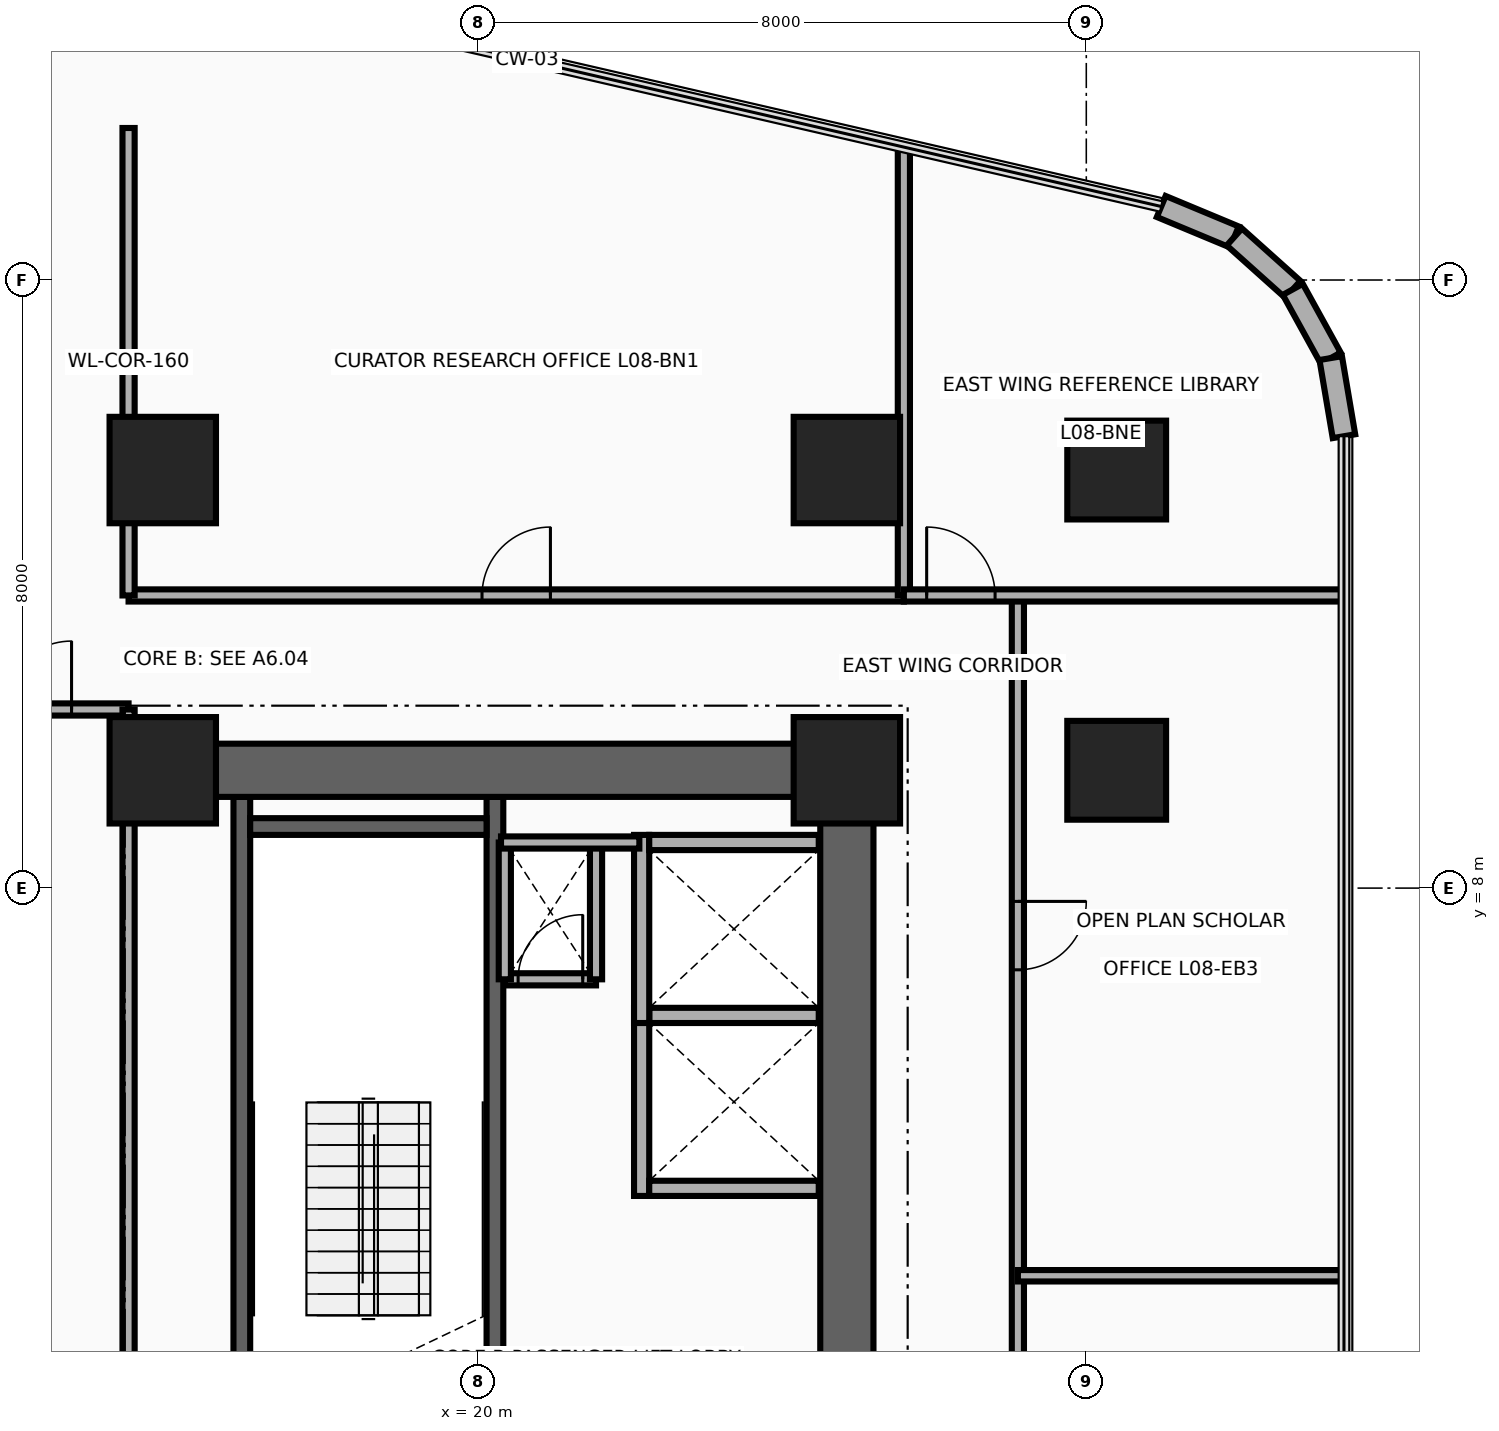
"""IFC4 building model, lengths in metres.
Left out: names, types, materials, properties, quantities, classifications, styles, units other than length and angle.
Written with IfcOpenShell. Run it as: python <this file> out.ifc"""

import sys

from ifc_helpers import new_model, si_unit, direction, frame, frame_2d, origin, origin_2d, place, context, subcontext, project, spatial, rectangle, circle, extrude, source, transform, mapped, element, fill, save


model = new_model("IFC4")
c1 = context("Model", 3, precision=1e-05, world=origin(), true_north=direction((0.0, 1.0)))
c2 = subcontext(c1, "Body", "Model", "MODEL_VIEW")
j1 = project(units=[si_unit("LENGTHUNIT", "METRE"), si_unit("PLANEANGLEUNIT", "RADIAN")], contexts=[c1])
p1 = place(None, origin())
s1 = spatial("IfcSite", under=j1, at=p1, CompositionType="ELEMENT")
p2 = place(p1, origin())
s2 = spatial("IfcBuilding", under=s1, at=p2, CompositionType="ELEMENT")
p3 = place(p2, frame((0.0, 0.0, 37.1)))
s3 = spatial("IfcBuildingStorey", under=s2, at=p3, CompositionType="ELEMENT", Elevation=37.1)
for number, where, z_axis, x_axis in (
    (1, (16.89, 0.68, 0.0), (0.0, 0.0, 1.0), (0.0, 1.0, 0.0)),
    (2, (20.22, 0.68, 0.0), (0.0, 0.0, 1.0), (0.0, 1.0, 0.0)),
):
    element("IfcWall", number, at=place(p3, frame(where, z_axis=z_axis, x_axis=x_axis)), inside=s3, PredefinedType="SHEAR", context=c2, shape_type="SweptSolid", body=[
        extrude(rectangle(XDim=8.52, YDim=0.22, at=frame_2d((4.26, 0.0))), origin(), (0.0, 0.0, 1.0), 3.46),
    ])
p4 = place(p3, frame((17.0, 8.81, 0.0), z_axis=(0.0, 0.0, 1.0), x_axis=(1.0, 0.0, 0.0)))
e3 = element("IfcWall", 3, at=p4, inside=s3, PredefinedType="SHEAR", context=c2, shape_type="SweptSolid", body=[
    extrude(rectangle(XDim=3.11, YDim=0.22, at=frame_2d((1.555, 0.0))), origin(), (0.0, 0.0, 1.0), 3.46),
])
p5 = place(p3, frame((24.85, 0.95, 0.0), z_axis=(0.0, 0.0, 1.0), x_axis=(0.0, 1.0, 0.0)))
e4 = element("IfcWall", 4, at=p5, inside=s3, PredefinedType="SHEAR", context=c2, shape_type="SweptSolid", body=[
    extrude(rectangle(XDim=8.95, YDim=0.7, at=frame_2d((4.475, 0.0))), origin(), (0.0, 0.0, 1.0), 3.46),
])
p6 = place(p3, frame((15.85, 9.55, 0.0), z_axis=(0.0, 0.0, 1.0), x_axis=(1.0, 0.0, 0.0)))
e5 = element("IfcWall", 5, at=p6, inside=s3, PredefinedType="SHEAR", context=c2, shape_type="SweptSolid", body=[
    extrude(rectangle(XDim=9.0, YDim=0.7, at=frame_2d((4.5, 0.0))), origin(), (0.0, 0.0, 1.0), 3.46),
])
m1 = source(origin(), c2, "Body", "SweptSolid", [
    extrude(rectangle(XDim=1.4, YDim=1.4, at=origin_2d()), origin(), (0.0, 0.0, 1.0), 3.7),
])
for number, where, z_axis, x_axis in (
    (6, (15.85, 9.55, 0.0), (0.0, 0.0, 1.0), (1.0, 0.0, 0.0)),
    (7, (24.85, 9.55, 0.0), (0.0, 0.0, 1.0), (1.0, 0.0, 0.0)),
):
    element("IfcColumn", number, at=place(p3, frame(where, z_axis=z_axis, x_axis=x_axis)), inside=s3, PredefinedType="COLUMN", context=c2, shape_type="MappedRepresentation", body=[
        mapped(m1, transform((0.0, 0.0, 0.0), x_axis=(1.0, 0.0, 0.0), y_axis=(0.0, 1.0, 0.0), z_axis=(0.0, 0.0, 1.0), scale=1.0)),
    ])
m2 = source(origin(), c2, "Body", "SweptSolid", [
    extrude(circle(Radius=0.65, at=origin_2d()), origin(), (0.0, 0.0, 1.0), 3.7),
])
p7 = place(p3, frame((28.4, 9.55, 0.0), z_axis=(0.0, 0.0, 1.0), x_axis=(1.0, 0.0, 0.0)))
e8 = element("IfcColumn", 8, at=p7, inside=s3, PredefinedType="COLUMN", context=c2, shape_type="MappedRepresentation", body=[
    mapped(m2, transform((0.0, 0.0, 0.0), x_axis=(1.0, 0.0, 0.0), y_axis=(0.0, 1.0, 0.0), z_axis=(0.0, 0.0, 1.0), scale=1.0)),
])
for number, where, z_axis, x_axis in (
    (9, (15.85, 13.5, 0.0), (0.0, 0.0, 1.0), (1.0, 0.0, 0.0)),
    (10, (24.85, 13.5, 0.0), (0.0, 0.0, 1.0), (1.0, 0.0, 0.0)),
):
    element("IfcColumn", number, at=place(p3, frame(where, z_axis=z_axis, x_axis=x_axis)), inside=s3, PredefinedType="COLUMN", context=c2, shape_type="MappedRepresentation", body=[
        mapped(m1, transform((0.0, 0.0, 0.0), x_axis=(1.0, 0.0, 0.0), y_axis=(0.0, 1.0, 0.0), z_axis=(0.0, 0.0, 1.0), scale=1.0)),
    ])
p8 = place(p3, frame((28.4, 13.5, 0.0), z_axis=(0.0, 0.0, 1.0), x_axis=(1.0, 0.0, 0.0)))
e11 = element("IfcColumn", 11, at=p8, inside=s3, PredefinedType="COLUMN", context=c2, shape_type="MappedRepresentation", body=[
    mapped(m2, transform((0.0, 0.0, 0.0), x_axis=(1.0, 0.0, 0.0), y_axis=(0.0, 1.0, 0.0), z_axis=(0.0, 0.0, 1.0), scale=1.0)),
])
p9 = place(p3, frame((28.986, 16.967, 0.0), z_axis=(0.0, 0.0, 1.0), x_axis=(0.923083852684, -0.384598753136, 0.0)))
e12 = element("IfcWall", 12, at=p9, inside=s3, PredefinedType="SOLIDWALL", context=c2, shape_type="SweptSolid", body=[
    extrude(rectangle(XDim=1.042, YDim=0.3, at=frame_2d((0.521, 0.0))), origin(), (0.0, 0.0, 1.0), 3.46),
])
p10 = place(p3, frame((29.948, 16.566, 0.0), z_axis=(0.0, 0.0, 1.0), x_axis=(0.744585645533, -0.66752694063, 0.0)))
e13 = element("IfcWall", 13, at=p10, inside=s3, PredefinedType="SOLIDWALL", context=c2, shape_type="SweptSolid", body=[
    extrude(rectangle(XDim=1.033, YDim=0.3, at=frame_2d((0.517, 0.0))), origin(), (0.0, 0.0, 1.0), 3.46),
])
p11 = place(p3, frame((30.717, 15.877, 0.0), z_axis=(0.0, 0.0, 1.0), x_axis=(0.482971098131, -0.875636293429, 0.0)))
e14 = element("IfcWall", 14, at=p11, inside=s3, PredefinedType="SOLIDWALL", context=c2, shape_type="SweptSolid", body=[
    extrude(rectangle(XDim=1.033, YDim=0.3, at=frame_2d((0.516, 0.0))), origin(), (0.0, 0.0, 1.0), 3.46),
])
p12 = place(p3, frame((31.216, 14.973, 0.0), z_axis=(0.0, 0.0, 1.0), x_axis=(0.167019462117, -0.985953598946, 0.0)))
e15 = element("IfcWall", 15, at=p12, inside=s3, PredefinedType="SOLIDWALL", context=c2, shape_type="SweptSolid", body=[
    extrude(rectangle(XDim=1.042, YDim=0.3, at=frame_2d((0.521, 0.0))), origin(), (0.0, 0.0, 1.0), 3.46),
])
p13 = place(p3, frame((22.15, 3.95, 0.0), z_axis=(0.0, 0.0, 1.0), x_axis=(0.0, 1.0, 0.0)))
e16 = element("IfcWall", 16, at=p13, inside=s3, PredefinedType="MOVABLE", context=c2, shape_type="SweptSolid", body=[
    extrude(rectangle(XDim=2.475, YDim=0.2, at=frame_2d((1.238, 0.0))), origin(), (0.0, 0.0, 1.0), 3.46),
])
for number, where, z_axis, x_axis in (
    (17, (22.25, 4.05, 0.0), (0.0, 0.0, 1.0), (1.0, 0.0, 0.0)),
    (18, (22.25, 6.325, 0.0), (0.0, 0.0, 1.0), (1.0, 0.0, 0.0)),
):
    element("IfcWall", number, at=place(p3, frame(where, z_axis=z_axis, x_axis=x_axis)), inside=s3, PredefinedType="MOVABLE", context=c2, shape_type="SweptSolid", body=[
        extrude(rectangle(XDim=2.23, YDim=0.2, at=frame_2d((1.115, 0.0))), origin(), (0.0, 0.0, 1.0), 2.245),
    ])
p14 = place(p3, frame((22.15, 6.225, 0.0), z_axis=(0.0, 0.0, 1.0), x_axis=(0.0, 1.0, 0.0)))
e19 = element("IfcWall", 19, at=p14, inside=s3, PredefinedType="MOVABLE", context=c2, shape_type="SweptSolid", body=[
    extrude(rectangle(XDim=2.475, YDim=0.2, at=frame_2d((1.237, 0.0))), origin(), (0.0, 0.0, 1.0), 3.46),
])
p15 = place(p3, frame((22.25, 8.6, 0.0), z_axis=(0.0, 0.0, 1.0), x_axis=(1.0, 0.0, 0.0)))
e20 = element("IfcWall", 20, at=p15, inside=s3, PredefinedType="MOVABLE", context=c2, shape_type="SweptSolid", body=[
    extrude(rectangle(XDim=2.23, YDim=0.2, at=frame_2d((1.115, 0.0))), origin(), (0.0, 0.0, 1.0), 2.245),
])
p16 = place(p3, frame((20.35, 6.8, 0.0), z_axis=(0.0, 0.0, 1.0), x_axis=(1.0, 0.0, 0.0)))
e21 = element("IfcWall", 21, at=p16, inside=s3, PredefinedType="PARTITIONING", context=c2, shape_type="SweptSolid", body=[
    extrude(rectangle(XDim=1.2, YDim=0.16, at=frame_2d((0.6, 0.0))), origin(), (0.0, 0.0, 1.0), 3.46),
])
p17 = place(p16, frame((0.175, 0.0, 0.0)))
e22 = element("IfcOpeningElement", 22, at=p17, cuts=e21, PredefinedType="OPENING", context=c2, shape_type="SweptSolid", body=[
    extrude(rectangle(XDim=0.85, YDim=2.05, at=frame_2d((0.425, 1.025))), frame((0.0, 0.095, 0.0), z_axis=(0.0, -1.0, 0.0), x_axis=(1.0, 0.0, 0.0)), (0.0, 0.0, 1.0), 0.19),
])
for number, where, z_axis, x_axis in (
    (23, (21.55, 6.8, 0.0), (0.0, 0.0, 1.0), (0.0, 1.0, 0.0)),
    (24, (20.35, 6.8, 0.0), (0.0, 0.0, 1.0), (0.0, 1.0, 0.0)),
):
    element("IfcWall", number, at=place(p3, frame(where, z_axis=z_axis, x_axis=x_axis)), inside=s3, PredefinedType="PARTITIONING", context=c2, shape_type="SweptSolid", body=[
        extrude(rectangle(XDim=1.8, YDim=0.16, at=frame_2d((0.9, 0.0))), origin(), (0.0, 0.0, 1.0), 3.46),
    ])
p18 = place(p3, frame((20.3, 8.6, 0.0), z_axis=(0.0, 0.0, 1.0), x_axis=(1.0, 0.0, 0.0)))
e25 = element("IfcWall", 25, at=p18, inside=s3, PredefinedType="PARTITIONING", context=c2, shape_type="SweptSolid", body=[
    extrude(rectangle(XDim=1.82, YDim=0.16, at=frame_2d((0.91, 0.0))), origin(), (0.0, 0.0, 1.0), 3.46),
])
p19 = place(p3, frame((15.4, 11.85, 0.0), z_axis=(0.0, 0.0, 1.0), x_axis=(1.0, 0.0, 0.0)))
e26 = element("IfcWall", 26, at=p19, inside=s3, PredefinedType="PARTITIONING", context=c2, shape_type="SweptSolid", body=[
    extrude(rectangle(XDim=10.2, YDim=0.16, at=frame_2d((5.1, 0.0))), origin(), (0.0, 0.0, 1.0), 2.834),
])
p20 = place(p19, frame((4.65, 0.0, 0.0)))
e27 = element("IfcOpeningElement", 27, at=p20, cuts=e26, PredefinedType="OPENING", context=c2, shape_type="SweptSolid", body=[
    extrude(rectangle(XDim=0.9, YDim=2.1, at=frame_2d((0.45, 1.05))), frame((0.0, 0.095, 0.0), z_axis=(0.0, -1.0, 0.0), x_axis=(1.0, 0.0, 0.0)), (0.0, 0.0, 1.0), 0.19),
])
p21 = place(p3, frame((15.4, 11.85, 0.0), z_axis=(0.0, 0.0, 1.0), x_axis=(0.0, 1.0, 0.0)))
e28 = element("IfcWall", 28, at=p21, inside=s3, PredefinedType="PARTITIONING", context=c2, shape_type="SweptSolid", body=[
    extrude(rectangle(XDim=6.15, YDim=0.16, at=frame_2d((3.075, 0.0))), origin(), (0.0, 0.0, 1.0), 2.583),
])
p22 = place(p3, frame((25.6, 11.85, 0.0), z_axis=(0.0, 0.0, 1.0), x_axis=(0.0, 1.0, 0.0)))
e29 = element("IfcWall", 29, at=p22, inside=s3, PredefinedType="PARTITIONING", context=c2, shape_type="SweptSolid", body=[
    extrude(rectangle(XDim=5.898, YDim=0.16, at=frame_2d((2.949, 0.0))), origin(), (0.0, 0.0, 1.0), 2.583),
])
p23 = place(p3, frame((27.1, -13.89, 0.0), z_axis=(0.0, 0.0, 1.0), x_axis=(0.0, 1.0, 0.0)))
e30 = element("IfcWall", 30, at=p23, inside=s3, PredefinedType="PARTITIONING", context=c2, shape_type="SweptSolid", body=[
    extrude(rectangle(XDim=25.74, YDim=0.16, at=frame_2d((12.87, 0.0))), origin(), (0.0, 0.0, 1.0), 2.583),
])
p24 = place(p23, frame((2.56, 0.0, 0.0)))
e31 = element("IfcOpeningElement", 31, at=p24, cuts=e30, PredefinedType="OPENING", context=c2, shape_type="SweptSolid", body=[
    extrude(rectangle(XDim=0.9, YDim=2.1, at=frame_2d((0.45, 1.05))), frame((0.0, 0.095, 0.0), z_axis=(0.0, -1.0, 0.0), x_axis=(1.0, 0.0, 0.0)), (0.0, 0.0, 1.0), 0.19),
])
p25 = place(p23, frame((12.16, 0.0, 0.0)))
e32 = element("IfcOpeningElement", 32, at=p25, cuts=e30, PredefinedType="OPENING", context=c2, shape_type="SweptSolid", body=[
    extrude(rectangle(XDim=0.9, YDim=2.1, at=frame_2d((0.45, 1.05))), frame((0.0, 0.095, 0.0), z_axis=(0.0, -1.0, 0.0), x_axis=(1.0, 0.0, 0.0)), (0.0, 0.0, 1.0), 0.19),
])
p26 = place(p23, frame((20.815, 0.0, 0.0)))
e33 = element("IfcOpeningElement", 33, at=p26, cuts=e30, PredefinedType="OPENING", context=c2, shape_type="SweptSolid", body=[
    extrude(rectangle(XDim=0.9, YDim=2.1, at=frame_2d((0.45, 1.05))), frame((0.0, 0.095, 0.0), z_axis=(0.0, -1.0, 0.0), x_axis=(1.0, 0.0, 0.0)), (0.0, 0.0, 1.0), 0.19),
])
p27 = place(p3, frame((25.6, 11.85, 0.0), z_axis=(0.0, 0.0, 1.0), x_axis=(1.0, 0.0, 0.0)))
e34 = element("IfcWall", 34, at=p27, inside=s3, PredefinedType="PARTITIONING", context=c2, shape_type="SweptSolid", body=[
    extrude(rectangle(XDim=5.79, YDim=0.16, at=frame_2d((2.895, 0.0))), origin(), (0.0, 0.0, 1.0), 2.896),
])
p28 = place(p27, frame((0.3, 0.0, 0.0)))
e35 = element("IfcOpeningElement", 35, at=p28, cuts=e34, PredefinedType="OPENING", context=c2, shape_type="SweptSolid", body=[
    extrude(rectangle(XDim=0.9, YDim=2.1, at=frame_2d((0.45, 1.05))), frame((0.0, 0.095, 0.0), z_axis=(0.0, -1.0, 0.0), x_axis=(1.0, 0.0, 0.0)), (0.0, 0.0, 1.0), 0.19),
])
p29 = place(p3, frame((27.1, 2.9, 0.0), z_axis=(0.0, 0.0, 1.0), x_axis=(1.0, 0.0, 0.0)))
e36 = element("IfcWall", 36, at=p29, inside=s3, PredefinedType="PARTITIONING", context=c2, shape_type="SweptSolid", body=[
    extrude(rectangle(XDim=4.29, YDim=0.15, at=frame_2d((2.145, 0.0))), origin(), (0.0, 0.0, 1.0), 2.896),
])
p30 = place(p3, frame((13.3, 10.35, 0.0), z_axis=(0.0, 0.0, 1.0), x_axis=(1.0, 0.0, 0.0)))
e37 = element("IfcWall", 37, at=p30, inside=s3, PredefinedType="PARTITIONING", context=c2, shape_type="SweptSolid", body=[
    extrude(rectangle(XDim=2.1, YDim=0.16, at=frame_2d((1.05, 0.0))), origin(), (0.0, 0.0, 1.0), 2.583),
])
p31 = place(p30, frame((0.45, 0.0, 0.0)))
e38 = element("IfcOpeningElement", 38, at=p31, cuts=e37, PredefinedType="OPENING", context=c2, shape_type="SweptSolid", body=[
    extrude(rectangle(XDim=0.9, YDim=2.1, at=frame_2d((0.45, 1.05))), frame((0.0, 0.095, 0.0), z_axis=(0.0, -1.0, 0.0), x_axis=(1.0, 0.0, 0.0)), (0.0, 0.0, 1.0), 0.19),
])
p32 = place(p3, frame((15.4, 1.0, 0.0), z_axis=(0.0, 0.0, 1.0), x_axis=(0.0, 1.0, 0.0)))
e39 = element("IfcWall", 39, at=p32, inside=s3, PredefinedType="PARTITIONING", context=c2, shape_type="SweptSolid", body=[
    extrude(rectangle(XDim=9.35, YDim=0.16, at=frame_2d((4.675, 0.0))), origin(), (0.0, 0.0, 1.0), 2.245),
])
p33 = place(p17, origin())
e40 = element("IfcDoor", 40, at=p33, inside=s3, OperationType="SINGLE_SWING_RIGHT", PredefinedType="DOOR", context=c2, shape_type="SweptSolid", body=[
    extrude(rectangle(XDim=0.85, YDim=2.05, at=frame_2d((0.425, 1.025))), frame((0.0, 0.025, 0.0), z_axis=(0.0, -1.0, 0.0), x_axis=(1.0, 0.0, 0.0)), (0.0, 0.0, 1.0), 0.05),
])
fill(e22, e40)
p34 = place(p20, origin())
e41 = element("IfcDoor", 41, at=p34, inside=s3, OperationType="SINGLE_SWING_RIGHT", PredefinedType="DOOR", context=c2, shape_type="SweptSolid", body=[
    extrude(rectangle(XDim=0.9, YDim=2.1, at=frame_2d((0.45, 1.05))), frame((0.0, 0.025, 0.0), z_axis=(0.0, -1.0, 0.0), x_axis=(1.0, 0.0, 0.0)), (0.0, 0.0, 1.0), 0.05),
])
fill(e27, e41)
p35 = place(p28, origin())
e42 = element("IfcDoor", 42, at=p35, inside=s3, OperationType="SINGLE_SWING_RIGHT", PredefinedType="DOOR", context=c2, shape_type="SweptSolid", body=[
    extrude(rectangle(XDim=0.9, YDim=2.1, at=frame_2d((0.45, 1.05))), frame((0.0, 0.025, 0.0), z_axis=(0.0, -1.0, 0.0), x_axis=(1.0, 0.0, 0.0)), (0.0, 0.0, 1.0), 0.05),
])
fill(e35, e42)
p36 = place(p26, frame((0.9, 0.0, 0.0), z_axis=(0.0, 0.0, 1.0), x_axis=(-1.0, 0.0, 0.0)))
e43 = element("IfcDoor", 43, at=p36, inside=s3, OperationType="SINGLE_SWING_LEFT", PredefinedType="DOOR", context=c2, shape_type="SweptSolid", body=[
    extrude(rectangle(XDim=0.9, YDim=2.1, at=frame_2d((0.45, 1.05))), frame((0.0, 0.025, 0.0), z_axis=(0.0, -1.0, 0.0), x_axis=(1.0, 0.0, 0.0)), (0.0, 0.0, 1.0), 0.05),
])
fill(e33, e43)
p37 = place(p31, origin())
e44 = element("IfcDoor", 44, at=p37, inside=s3, OperationType="SINGLE_SWING_RIGHT", PredefinedType="DOOR", context=c2, shape_type="SweptSolid", body=[
    extrude(rectangle(XDim=0.9, YDim=2.1, at=frame_2d((0.45, 1.05))), frame((0.0, 0.025, 0.0), z_axis=(0.0, -1.0, 0.0), x_axis=(1.0, 0.0, 0.0)), (0.0, 0.0, 1.0), 0.05),
])
fill(e38, e44)
save(model, sys.argv[1])
